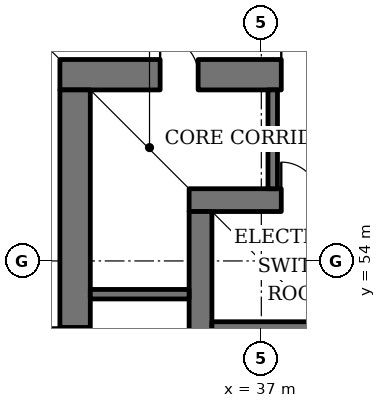
"""IFC4 building model, lengths in metres.
Left out: names, types, materials, properties, quantities, classifications, styles, units other than length and angle.
Written with IfcOpenShell. Run it as: python <this file> out.ifc"""

import sys

from ifc_helpers import new_model, si_unit, direction, frame, frame_2d, origin, place, context, subcontext, project, spatial, rectangle, extrude, element, fill, save


model = new_model("IFC4")
c1 = context("Model", 3, precision=1e-05, world=origin(), true_north=direction((0.0, 1.0)))
c2 = subcontext(c1, "Body", "Model", "MODEL_VIEW")
j1 = project(units=[si_unit("LENGTHUNIT", "METRE"), si_unit("PLANEANGLEUNIT", "RADIAN")], contexts=[c1])
p1 = place(None, origin())
s1 = spatial("IfcSite", under=j1, at=p1, CompositionType="ELEMENT")
p2 = place(p1, origin())
s2 = spatial("IfcBuilding", under=s1, at=p2, CompositionType="ELEMENT")
p3 = place(p2, frame((0.0, 0.0, -10.0)))
s3 = spatial("IfcBuildingStorey", under=s2, at=p3, CompositionType="ELEMENT", Elevation=-10.0)
p4 = place(p3, frame((35.1, 55.6, 0.0), z_axis=(0.0, 0.0, 1.0), x_axis=(1.0, 0.0, 0.0)))
e1 = element("IfcWall", 1, at=p4, inside=s3, PredefinedType="SHEAR", context=c2, shape_type="SweptSolid", body=[
    extrude(rectangle(XDim=19.8, YDim=0.6, at=frame_2d((9.9, 0.0))), origin(), (0.0, 0.0, 1.0), 5.0),
])
p5 = place(p4, frame((14.54, 0.0, 0.0)))
e2 = element("IfcOpeningElement", 2, at=p5, cuts=e1, PredefinedType="OPENING", context=c2, shape_type="SweptSolid", body=[
    extrude(rectangle(XDim=1.0, YDim=2.1, at=frame_2d((0.5, 1.05))), frame((0.0, 0.31, 0.0), z_axis=(0.0, -1.0, 0.0), x_axis=(1.0, 0.0, 0.0)), (0.0, 0.0, 1.0), 0.62),
])
p6 = place(p4, frame((12.18, 0.0, 0.0)))
e3 = element("IfcOpeningElement", 3, at=p6, cuts=e1, PredefinedType="OPENING", context=c2, shape_type="SweptSolid", body=[
    extrude(rectangle(XDim=1.0, YDim=2.1, at=frame_2d((0.5, 1.05))), frame((0.0, 0.31, 0.0), z_axis=(0.0, -1.0, 0.0), x_axis=(1.0, 0.0, 0.0)), (0.0, 0.0, 1.0), 0.62),
])
p7 = place(p4, frame((2.425, 0.0, 0.0)))
e4 = element("IfcOpeningElement", 4, at=p7, cuts=e1, PredefinedType="OPENING", context=c2, shape_type="SweptSolid", body=[
    extrude(rectangle(XDim=1.0, YDim=2.1, at=frame_2d((0.5, 1.05))), frame((0.0, 0.31, 0.0), z_axis=(0.0, -1.0, 0.0), x_axis=(1.0, 0.0, 0.0)), (0.0, 0.0, 1.0), 0.62),
])
p8 = place(p3, frame((35.4, 36.7, 0.0), z_axis=(0.0, 0.0, 1.0), x_axis=(0.0, 1.0, 0.0)))
e5 = element("IfcWall", 5, at=p8, inside=s3, PredefinedType="SHEAR", context=c2, shape_type="SweptSolid", body=[
    extrude(rectangle(XDim=18.6, YDim=0.6, at=frame_2d((9.3, 0.0))), origin(), (0.0, 0.0, 1.0), 5.0),
])
p9 = place(p8, frame((8.4, 0.0, 0.0)))
e6 = element("IfcOpeningElement", 6, at=p9, cuts=e5, PredefinedType="OPENING", context=c2, shape_type="SweptSolid", body=[
    extrude(rectangle(XDim=1.8, YDim=2.4, at=frame_2d((0.9, 1.2))), frame((0.0, 0.31, 0.0), z_axis=(0.0, -1.0, 0.0), x_axis=(1.0, 0.0, 0.0)), (0.0, 0.0, 1.0), 0.62),
])
p10 = place(p3, frame((31.7, 58.9, 0.0), z_axis=(0.0, 0.0, 1.0), x_axis=(1.0, 0.0, 0.0)))
e7 = element("IfcWall", 7, at=p10, inside=s3, PredefinedType="SHEAR", context=c2, shape_type="SweptSolid", body=[
    extrude(rectangle(XDim=26.6, YDim=0.8, at=frame_2d((13.3, 0.0))), origin(), (0.0, 0.0, 1.0), 5.0),
])
p11 = place(p10, frame((17.94, 0.0, 0.0)))
e8 = element("IfcOpeningElement", 8, at=p11, cuts=e7, PredefinedType="OPENING", context=c2, shape_type="SweptSolid", body=[
    extrude(rectangle(XDim=1.0, YDim=2.1, at=frame_2d((0.5, 1.05))), frame((0.0, 0.41, 0.0), z_axis=(0.0, -1.0, 0.0), x_axis=(1.0, 0.0, 0.0)), (0.0, 0.0, 1.0), 0.82),
])
p12 = place(p10, frame((12.44, 0.0, 0.0)))
e9 = element("IfcOpeningElement", 9, at=p12, cuts=e7, PredefinedType="OPENING", context=c2, shape_type="SweptSolid", body=[
    extrude(rectangle(XDim=1.0, YDim=2.1, at=frame_2d((0.5, 1.05))), frame((0.0, 0.41, 0.0), z_axis=(0.0, -1.0, 0.0), x_axis=(1.0, 0.0, 0.0)), (0.0, 0.0, 1.0), 0.82),
])
p13 = place(p10, frame((5.825, 0.0, 0.0)))
e10 = element("IfcOpeningElement", 10, at=p13, cuts=e7, PredefinedType="OPENING", context=c2, shape_type="SweptSolid", body=[
    extrude(rectangle(XDim=1.0, YDim=2.1, at=frame_2d((0.5, 1.05))), frame((0.0, 0.41, 0.0), z_axis=(0.0, -1.0, 0.0), x_axis=(1.0, 0.0, 0.0)), (0.0, 0.0, 1.0), 0.82),
])
p14 = place(p10, frame((2.637, 0.0, 0.0)))
e11 = element("IfcOpeningElement", 11, at=p14, cuts=e7, PredefinedType="OPENING", context=c2, shape_type="SweptSolid", body=[
    extrude(rectangle(XDim=1.0, YDim=2.1, at=frame_2d((0.5, 1.05))), frame((0.0, 0.41, 0.0), z_axis=(0.0, -1.0, 0.0), x_axis=(1.0, 0.0, 0.0)), (0.0, 0.0, 1.0), 0.82),
])
p15 = place(p10, frame((20.875, 0.0, 0.0)))
e12 = element("IfcOpeningElement", 12, at=p15, cuts=e7, PredefinedType="OPENING", context=c2, shape_type="SweptSolid", body=[
    extrude(rectangle(XDim=1.0, YDim=2.1, at=frame_2d((0.5, 1.05))), frame((0.0, 0.41, 0.0), z_axis=(0.0, -1.0, 0.0), x_axis=(1.0, 0.0, 0.0)), (0.0, 0.0, 1.0), 0.82),
])
p16 = place(p10, frame((23.7, 0.0, 0.0)))
e13 = element("IfcOpeningElement", 13, at=p16, cuts=e7, PredefinedType="OPENING", context=c2, shape_type="SweptSolid", body=[
    extrude(rectangle(XDim=1.0, YDim=2.1, at=frame_2d((0.5, 1.05))), frame((0.0, 0.41, 0.0), z_axis=(0.0, -1.0, 0.0), x_axis=(1.0, 0.0, 0.0)), (0.0, 0.0, 1.0), 0.82),
])
p17 = place(p3, frame((32.1, 33.5, 0.0), z_axis=(0.0, 0.0, 1.0), x_axis=(0.0, 1.0, 0.0)))
e14 = element("IfcWall", 14, at=p17, inside=s3, PredefinedType="SHEAR", context=c2, shape_type="SweptSolid", body=[
    extrude(rectangle(XDim=25.0, YDim=0.8, at=frame_2d((12.5, 0.0))), origin(), (0.0, 0.0, 1.0), 5.0),
])
p18 = place(p17, frame((11.6, 0.0, 0.0)))
e15 = element("IfcOpeningElement", 15, at=p18, cuts=e14, PredefinedType="OPENING", context=c2, shape_type="SweptSolid", body=[
    extrude(rectangle(XDim=1.8, YDim=2.4, at=frame_2d((0.9, 1.2))), frame((0.0, 0.41, 0.0), z_axis=(0.0, -1.0, 0.0), x_axis=(1.0, 0.0, 0.0)), (0.0, 0.0, 1.0), 0.82),
])
p19 = place(p17, frame((3.5, 0.0, 0.0)))
e16 = element("IfcOpeningElement", 16, at=p19, cuts=e14, PredefinedType="OPENING", context=c2, shape_type="SweptSolid", body=[
    extrude(rectangle(XDim=1.0, YDim=2.1, at=frame_2d((0.5, 1.05))), frame((0.0, 0.41, 0.0), z_axis=(0.0, -1.0, 0.0), x_axis=(1.0, 0.0, 0.0)), (0.0, 0.0, 1.0), 0.82),
])
p20 = place(p17, frame((6.25, 0.0, 0.0)))
e17 = element("IfcOpeningElement", 17, at=p20, cuts=e14, PredefinedType="OPENING", context=c2, shape_type="SweptSolid", body=[
    extrude(rectangle(XDim=1.0, YDim=2.1, at=frame_2d((0.5, 1.05))), frame((0.0, 0.41, 0.0), z_axis=(0.0, -1.0, 0.0), x_axis=(1.0, 0.0, 0.0)), (0.0, 0.0, 1.0), 0.82),
])
p21 = place(p17, frame((9.0, 0.0, 0.0)))
e18 = element("IfcOpeningElement", 18, at=p21, cuts=e14, PredefinedType="OPENING", context=c2, shape_type="SweptSolid", body=[
    extrude(rectangle(XDim=1.0, YDim=2.1, at=frame_2d((0.5, 1.05))), frame((0.0, 0.41, 0.0), z_axis=(0.0, -1.0, 0.0), x_axis=(1.0, 0.0, 0.0)), (0.0, 0.0, 1.0), 0.82),
])
p22 = place(p17, frame((15.0, 0.0, 0.0)))
e19 = element("IfcOpeningElement", 19, at=p22, cuts=e14, PredefinedType="OPENING", context=c2, shape_type="SweptSolid", body=[
    extrude(rectangle(XDim=1.0, YDim=2.1, at=frame_2d((0.5, 1.05))), frame((0.0, 0.41, 0.0), z_axis=(0.0, -1.0, 0.0), x_axis=(1.0, 0.0, 0.0)), (0.0, 0.0, 1.0), 0.82),
])
p23 = place(p17, frame((17.75, 0.0, 0.0)))
e20 = element("IfcOpeningElement", 20, at=p23, cuts=e14, PredefinedType="OPENING", context=c2, shape_type="SweptSolid", body=[
    extrude(rectangle(XDim=1.0, YDim=2.1, at=frame_2d((0.5, 1.05))), frame((0.0, 0.41, 0.0), z_axis=(0.0, -1.0, 0.0), x_axis=(1.0, 0.0, 0.0)), (0.0, 0.0, 1.0), 0.82),
])
p24 = place(p3, frame((35.7, 52.2, 0.0), z_axis=(0.0, 0.0, 1.0), x_axis=(1.0, 0.0, 0.0)))
e21 = element("IfcWall", 21, at=p24, inside=s3, PredefinedType="SHEAR", context=c2, shape_type="SweptSolid", body=[
    extrude(rectangle(XDim=18.6, YDim=0.4, at=frame_2d((9.3, 0.0))), origin(), (0.0, 0.0, 1.0), 5.0),
])
p25 = place(p3, frame((32.5, 53.125, 0.0), z_axis=(0.0, 0.0, 1.0), x_axis=(1.0, 0.0, 0.0)))
e22 = element("IfcWall", 22, at=p25, inside=s3, PredefinedType="SHEAR", context=c2, shape_type="SweptSolid", body=[
    extrude(rectangle(XDim=2.6, YDim=0.25, at=frame_2d((1.3, 0.0))), origin(), (0.0, 0.0, 1.0), 5.0),
])
p26 = place(p3, frame((37.3, 55.9, 0.0), z_axis=(0.0, 0.0, 1.0), x_axis=(0.0, 1.0, 0.0)))
e23 = element("IfcWall", 23, at=p26, inside=s3, PredefinedType="SOLIDWALL", context=c2, shape_type="SweptSolid", body=[
    extrude(rectangle(XDim=2.6, YDim=0.25, at=frame_2d((1.3, 0.0))), origin(), (0.0, 0.0, 1.0), 4.7),
])
p27 = place(p13, origin())
e24 = element("IfcDoor", 24, at=p27, inside=s3, OperationType="SINGLE_SWING_LEFT", PredefinedType="DOOR", context=c2, shape_type="SweptSolid", body=[
    extrude(rectangle(XDim=1.0, YDim=2.1, at=frame_2d((0.5, 1.05))), frame((0.0, 0.025, 0.0), z_axis=(0.0, -1.0, 0.0), x_axis=(1.0, 0.0, 0.0)), (0.0, 0.0, 1.0), 0.05),
])
fill(e10, e24)
p28 = place(p7, origin())
e25 = element("IfcDoor", 25, at=p28, inside=s3, OperationType="SINGLE_SWING_LEFT", PredefinedType="DOOR", context=c2, shape_type="SweptSolid", body=[
    extrude(rectangle(XDim=1.0, YDim=2.1, at=frame_2d((0.5, 1.05))), frame((0.0, -0.24, 0.0), z_axis=(0.0, -1.0, 0.0), x_axis=(1.0, 0.0, 0.0)), (0.0, 0.0, 1.0), 0.05),
])
fill(e4, e25)
p29 = place(p14, origin())
e26 = element("IfcDoor", 26, at=p29, inside=s3, OperationType="SINGLE_SWING_LEFT", PredefinedType="DOOR", context=c2, shape_type="SweptSolid", body=[
    extrude(rectangle(XDim=1.0, YDim=2.1, at=frame_2d((0.5, 1.05))), frame((0.0, -0.34, 0.0), z_axis=(0.0, -1.0, 0.0), x_axis=(1.0, 0.0, 0.0)), (0.0, 0.0, 1.0), 0.05),
])
fill(e11, e26)
save(model, sys.argv[1])
